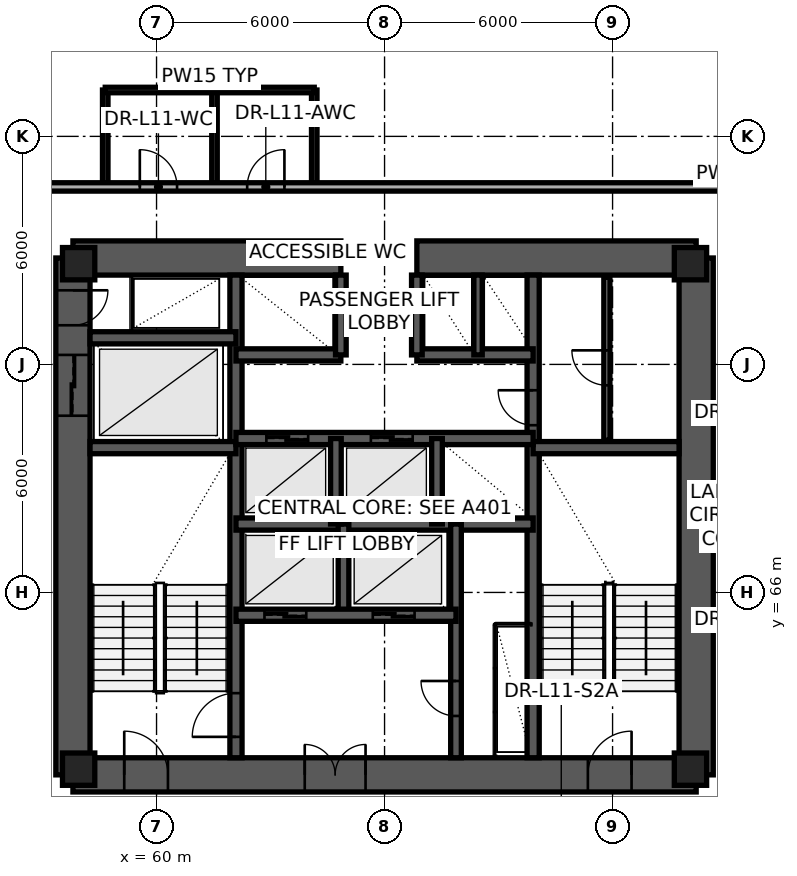
"""IFC4 building model, lengths in metres.
Left out: names, types, materials, properties, quantities, classifications, styles, units other than length and angle.
Written with IfcOpenShell. Run it as: python <this file> out.ifc"""

import sys

from ifc_helpers import new_model, si_unit, direction, frame, frame_2d, origin, origin_2d, place, context, subcontext, project, spatial, rectangle, extrude, element, fill, save


model = new_model("IFC4")
c1 = context("Model", 3, precision=1e-05, world=origin(), true_north=direction((0.0, 1.0)))
c2 = subcontext(c1, "Body", "Model", "MODEL_VIEW")
j1 = project(units=[si_unit("LENGTHUNIT", "METRE"), si_unit("PLANEANGLEUNIT", "RADIAN")], contexts=[c1])
p1 = place(None, origin())
s1 = spatial("IfcSite", under=j1, at=p1, CompositionType="ELEMENT")
p2 = place(p1, origin())
s2 = spatial("IfcBuilding", under=s1, at=p2, CompositionType="ELEMENT")
p3 = place(p2, frame((0.0, 0.0, 44.7)))
s3 = spatial("IfcBuildingStorey", under=s2, at=p3, CompositionType="ELEMENT", Elevation=44.7)
p4 = place(p3, frame((57.8, 61.2, 0.0), z_axis=(0.0, 0.0, 1.0), x_axis=(1.0, 0.0, 0.0)))
e1 = element("IfcWall", 1, at=p4, inside=s3, PredefinedType="SHEAR", context=c2, shape_type="SweptSolid", body=[
    extrude(rectangle(XDim=16.4, YDim=0.9, at=frame_2d((8.2, 0.0))), origin(), (0.0, 0.0, 1.0), 3.65),
])
p5 = place(p4, frame((1.35, 0.0, 0.0)))
e2 = element("IfcOpeningElement", 2, at=p5, cuts=e1, PredefinedType="OPENING", context=c2, shape_type="SweptSolid", body=[
    extrude(rectangle(XDim=1.15, YDim=2.15, at=frame_2d((0.575, 1.075))), frame((0.0, 0.46, 0.0), z_axis=(0.0, -1.0, 0.0), x_axis=(1.0, 0.0, 0.0)), (0.0, 0.0, 1.0), 0.92),
])
p6 = place(p4, frame((6.1, 0.0, 0.0)))
e3 = element("IfcOpeningElement", 3, at=p6, cuts=e1, PredefinedType="OPENING", context=c2, shape_type="SweptSolid", body=[
    extrude(rectangle(XDim=1.6, YDim=2.15, at=frame_2d((0.8, 1.075))), frame((0.0, 0.46, 0.0), z_axis=(0.0, -1.0, 0.0), x_axis=(1.0, 0.0, 0.0)), (0.0, 0.0, 1.0), 0.92),
])
p7 = place(p4, frame((13.55, 0.0, 0.0)))
e4 = element("IfcOpeningElement", 4, at=p7, cuts=e1, PredefinedType="OPENING", context=c2, shape_type="SweptSolid", body=[
    extrude(rectangle(XDim=1.15, YDim=2.15, at=frame_2d((0.575, 1.075))), frame((0.0, 0.46, 0.0), z_axis=(0.0, -1.0, 0.0), x_axis=(1.0, 0.0, 0.0)), (0.0, 0.0, 1.0), 0.92),
])
p8 = place(p3, frame((74.2, 61.2, 0.0), z_axis=(0.0, 0.0, 1.0), x_axis=(0.0, 1.0, 0.0)))
e5 = element("IfcWall", 5, at=p8, inside=s3, PredefinedType="SHEAR", context=c2, shape_type="SweptSolid", body=[
    extrude(rectangle(XDim=13.6, YDim=0.9, at=frame_2d((6.8, 0.0))), origin(), (0.0, 0.0, 1.0), 3.65),
])
p9 = place(p3, frame((74.2, 74.8, 0.0), z_axis=(0.0, 0.0, 1.0), x_axis=(-1.0, 0.0, 0.0)))
e6 = element("IfcWall", 6, at=p9, inside=s3, PredefinedType="SHEAR", context=c2, shape_type="SweptSolid", body=[
    extrude(rectangle(XDim=7.35, YDim=0.9, at=frame_2d((3.675, 0.0))), origin(), (0.0, 0.0, 1.0), 3.65),
])
p10 = place(p3, frame((64.85, 74.8, 0.0), z_axis=(0.0, 0.0, 1.0), x_axis=(-1.0, 0.0, 0.0)))
e7 = element("IfcWall", 7, at=p10, inside=s3, PredefinedType="SHEAR", context=c2, shape_type="SweptSolid", body=[
    extrude(rectangle(XDim=7.05, YDim=0.9, at=frame_2d((3.525, 0.0))), origin(), (0.0, 0.0, 1.0), 3.65),
])
p11 = place(p3, frame((57.8, 74.8, 0.0), z_axis=(0.0, 0.0, 1.0), x_axis=(0.0, -1.0, 0.0)))
e8 = element("IfcWall", 8, at=p11, inside=s3, PredefinedType="SHEAR", context=c2, shape_type="SweptSolid", body=[
    extrude(rectangle(XDim=13.6, YDim=0.9, at=frame_2d((6.8, 0.0))), origin(), (0.0, 0.0, 1.0), 3.65),
])
p12 = place(p11, frame((0.85, 0.0, 0.0)))
e9 = element("IfcOpeningElement", 9, at=p12, cuts=e8, PredefinedType="OPENING", context=c2, shape_type="SweptSolid", body=[
    extrude(rectangle(XDim=0.92, YDim=2.05, at=frame_2d((0.46, 1.025))), frame((0.0, 0.46, 0.0), z_axis=(0.0, -1.0, 0.0), x_axis=(1.0, 0.0, 0.0)), (0.0, 0.0, 1.0), 0.92),
])
p13 = place(p11, frame((2.55, 0.0, 0.0)))
e10 = element("IfcOpeningElement", 10, at=p13, cuts=e8, PredefinedType="OPENING", context=c2, shape_type="SweptSolid", body=[
    extrude(rectangle(XDim=1.6, YDim=2.3, at=frame_2d((0.8, 1.15))), frame((0.0, 0.46, 0.0), z_axis=(0.0, -1.0, 0.0), x_axis=(1.0, 0.0, 0.0)), (0.0, 0.0, 1.0), 0.92),
])
p14 = place(p3, frame((62.09, 61.65, 0.0), z_axis=(0.0, 0.0, 1.0), x_axis=(0.0, 1.0, 0.0)))
e11 = element("IfcWall", 11, at=p14, inside=s3, PredefinedType="SHEAR", context=c2, shape_type="SweptSolid", body=[
    extrude(rectangle(XDim=12.7, YDim=0.32, at=frame_2d((6.35, 0.0))), origin(), (0.0, 0.0, 1.0), 3.65),
])
p15 = place(p14, frame((0.55, 0.0, 0.0)))
e12 = element("IfcOpeningElement", 12, at=p15, cuts=e11, PredefinedType="OPENING", context=c2, shape_type="SweptSolid", body=[
    extrude(rectangle(XDim=1.15, YDim=2.15, at=frame_2d((0.575, 1.075))), frame((0.0, 0.17, 0.0), z_axis=(0.0, -1.0, 0.0), x_axis=(1.0, 0.0, 0.0)), (0.0, 0.0, 1.0), 0.34),
])
p16 = place(p3, frame((69.91, 61.65, 0.0), z_axis=(0.0, 0.0, 1.0), x_axis=(0.0, 1.0, 0.0)))
e13 = element("IfcWall", 13, at=p16, inside=s3, PredefinedType="SHEAR", context=c2, shape_type="SweptSolid", body=[
    extrude(rectangle(XDim=12.7, YDim=0.32, at=frame_2d((6.35, 0.0))), origin(), (0.0, 0.0, 1.0), 3.65),
])
p17 = place(p16, frame((8.75, 0.0, 0.0)))
e14 = element("IfcOpeningElement", 14, at=p17, cuts=e13, PredefinedType="OPENING", context=c2, shape_type="SweptSolid", body=[
    extrude(rectangle(XDim=0.92, YDim=2.05, at=frame_2d((0.46, 1.025))), frame((0.0, 0.17, 0.0), z_axis=(0.0, -1.0, 0.0), x_axis=(1.0, 0.0, 0.0)), (0.0, 0.0, 1.0), 0.34),
])
for number, where, z_axis, x_axis in (
    (15, (58.25, 69.81, 0.0), (0.0, 0.0, 1.0), (1.0, 0.0, 0.0)),
    (16, (69.91, 69.81, 0.0), (0.0, 0.0, 1.0), (1.0, 0.0, 0.0)),
    (17, (58.25, 72.7, 0.0), (0.0, 0.0, 1.0), (1.0, 0.0, 0.0)),
):
    element("IfcWall", number, at=place(p3, frame(where, z_axis=z_axis, x_axis=x_axis)), inside=s3, PredefinedType="SHEAR", context=c2, shape_type="SweptSolid", body=[
        extrude(rectangle(XDim=3.84, YDim=0.32, at=frame_2d((1.92, 0.0))), origin(), (0.0, 0.0, 1.0), 3.65),
    ])
p18 = place(p3, frame((62.09, 67.8, 0.0), z_axis=(0.0, 0.0, 1.0), x_axis=(1.0, 0.0, 0.0)))
e18 = element("IfcWall", 18, at=p18, inside=s3, PredefinedType="SHEAR", context=c2, shape_type="SweptSolid", body=[
    extrude(rectangle(XDim=7.82, YDim=0.32, at=frame_2d((3.91, 0.0))), origin(), (0.0, 0.0, 1.0), 3.65),
])
p19 = place(p3, frame((64.92, 65.4, 0.0), z_axis=(0.0, 0.0, 1.0), x_axis=(0.0, 1.0, 0.0)))
e19 = element("IfcWall", 19, at=p19, inside=s3, PredefinedType="SHEAR", context=c2, shape_type="SweptSolid", body=[
    extrude(rectangle(XDim=2.4, YDim=0.28, at=frame_2d((1.2, 0.0))), origin(), (0.0, 0.0, 1.0), 3.65),
])
p20 = place(p3, frame((62.09, 70.05, 0.0), z_axis=(0.0, 0.0, 1.0), x_axis=(1.0, 0.0, 0.0)))
e20 = element("IfcWall", 20, at=p20, inside=s3, PredefinedType="SHEAR", context=c2, shape_type="SweptSolid", body=[
    extrude(rectangle(XDim=7.82, YDim=0.32, at=frame_2d((3.91, 0.0))), origin(), (0.0, 0.0, 1.0), 3.65),
])
p21 = place(p20, frame((0.8, 0.0, 0.0)))
e21 = element("IfcOpeningElement", 21, at=p21, cuts=e20, PredefinedType="OPENING", context=c2, shape_type="SweptSolid", body=[
    extrude(rectangle(XDim=1.1, YDim=2.2, at=frame_2d((0.55, 1.1))), frame((0.0, 0.17, 0.0), z_axis=(0.0, -1.0, 0.0), x_axis=(1.0, 0.0, 0.0)), (0.0, 0.0, 1.0), 0.34),
])
p22 = place(p20, frame((3.55, 0.0, 0.0)))
e22 = element("IfcOpeningElement", 22, at=p22, cuts=e20, PredefinedType="OPENING", context=c2, shape_type="SweptSolid", body=[
    extrude(rectangle(XDim=1.1, YDim=2.2, at=frame_2d((0.55, 1.1))), frame((0.0, 0.17, 0.0), z_axis=(0.0, -1.0, 0.0), x_axis=(1.0, 0.0, 0.0)), (0.0, 0.0, 1.0), 0.34),
])
p23 = place(p3, frame((62.09, 72.25, 0.0), z_axis=(0.0, 0.0, 1.0), x_axis=(1.0, 0.0, 0.0)))
e23 = element("IfcWall", 23, at=p23, inside=s3, PredefinedType="SHEAR", context=c2, shape_type="SweptSolid", body=[
    extrude(rectangle(XDim=2.76, YDim=0.32, at=frame_2d((1.38, 0.0))), origin(), (0.0, 0.0, 1.0), 3.65),
])
p24 = place(p3, frame((66.85, 72.25, 0.0), z_axis=(0.0, 0.0, 1.0), x_axis=(1.0, 0.0, 0.0)))
e24 = element("IfcWall", 24, at=p24, inside=s3, PredefinedType="SHEAR", context=c2, shape_type="SweptSolid", body=[
    extrude(rectangle(XDim=3.06, YDim=0.32, at=frame_2d((1.53, 0.0))), origin(), (0.0, 0.0, 1.0), 3.65),
])
for number, where, z_axis, x_axis in (
    (25, (64.85, 72.25, 0.0), (0.0, 0.0, 1.0), (0.0, 1.0, 0.0)),
    (26, (66.85, 72.25, 0.0), (0.0, 0.0, 1.0), (0.0, 1.0, 0.0)),
):
    element("IfcWall", number, at=place(p3, frame(where, z_axis=z_axis, x_axis=x_axis)), inside=s3, PredefinedType="SHEAR", context=c2, shape_type="SweptSolid", body=[
        extrude(rectangle(XDim=2.1, YDim=0.28, at=frame_2d((1.05, 0.0))), origin(), (0.0, 0.0, 1.0), 3.65),
    ])
p25 = place(p3, frame((68.46, 72.25, 0.0), z_axis=(0.0, 0.0, 1.0), x_axis=(0.0, 1.0, 0.0)))
e27 = element("IfcWall", 27, at=p25, inside=s3, PredefinedType="SHEAR", context=c2, shape_type="SweptSolid", body=[
    extrude(rectangle(XDim=2.1, YDim=0.22, at=frame_2d((1.05, 0.0))), origin(), (0.0, 0.0, 1.0), 3.65),
])
p26 = place(p3, frame((67.88, 61.65, 0.0), z_axis=(0.0, 0.0, 1.0), x_axis=(0.0, 1.0, 0.0)))
e28 = element("IfcWall", 28, at=p26, inside=s3, PredefinedType="SHEAR", context=c2, shape_type="SweptSolid", body=[
    extrude(rectangle(XDim=6.15, YDim=0.28, at=frame_2d((3.075, 0.0))), origin(), (0.0, 0.0, 1.0), 3.65),
])
p27 = place(p26, frame((1.1, 0.0, 0.0)))
e29 = element("IfcOpeningElement", 29, at=p27, cuts=e28, PredefinedType="OPENING", context=c2, shape_type="SweptSolid", body=[
    extrude(rectangle(XDim=0.92, YDim=2.05, at=frame_2d((0.46, 1.025))), frame((0.0, 0.15, 0.0), z_axis=(0.0, -1.0, 0.0), x_axis=(1.0, 0.0, 0.0)), (0.0, 0.0, 1.0), 0.3),
])
p28 = place(p3, frame((62.09, 65.4, 0.0), z_axis=(0.0, 0.0, 1.0), x_axis=(1.0, 0.0, 0.0)))
e30 = element("IfcWall", 30, at=p28, inside=s3, PredefinedType="SHEAR", context=c2, shape_type="SweptSolid", body=[
    extrude(rectangle(XDim=5.79, YDim=0.32, at=frame_2d((2.895, 0.0))), origin(), (0.0, 0.0, 1.0), 3.65),
])
p29 = place(p28, frame((0.75, 0.0, 0.0)))
e31 = element("IfcOpeningElement", 31, at=p29, cuts=e30, PredefinedType="OPENING", context=c2, shape_type="SweptSolid", body=[
    extrude(rectangle(XDim=1.1, YDim=2.2, at=frame_2d((0.55, 1.1))), frame((0.0, 0.17, 0.0), z_axis=(0.0, -1.0, 0.0), x_axis=(1.0, 0.0, 0.0)), (0.0, 0.0, 1.0), 0.34),
])
p30 = place(p28, frame((3.6, 0.0, 0.0)))
e32 = element("IfcOpeningElement", 32, at=p30, cuts=e30, PredefinedType="OPENING", context=c2, shape_type="SweptSolid", body=[
    extrude(rectangle(XDim=1.1, YDim=2.2, at=frame_2d((0.55, 1.1))), frame((0.0, 0.17, 0.0), z_axis=(0.0, -1.0, 0.0), x_axis=(1.0, 0.0, 0.0)), (0.0, 0.0, 1.0), 0.34),
])
for number, where, z_axis, x_axis in (
    (33, (64.72, 67.8, 0.0), (0.0, 0.0, 1.0), (0.0, 1.0, 0.0)),
    (34, (67.38, 67.8, 0.0), (0.0, 0.0, 1.0), (0.0, 1.0, 0.0)),
):
    element("IfcWall", number, at=place(p3, frame(where, z_axis=z_axis, x_axis=x_axis)), inside=s3, PredefinedType="SHEAR", context=c2, shape_type="SweptSolid", body=[
        extrude(rectangle(XDim=2.25, YDim=0.28, at=frame_2d((1.125, 0.0))), origin(), (0.0, 0.0, 1.0), 3.65),
    ])
for number, where, z_axis, x_axis in (
    (35, (57.95, 61.35, 0.0), (0.0, 0.0, 1.0), (1.0, 0.0, 0.0)),
    (36, (74.05, 61.35, 0.0), (0.0, 0.0, 1.0), (1.0, 0.0, 0.0)),
    (37, (74.05, 74.65, 0.0), (0.0, 0.0, 1.0), (1.0, 0.0, 0.0)),
    (38, (57.95, 74.65, 0.0), (0.0, 0.0, 1.0), (1.0, 0.0, 0.0)),
):
    element("IfcColumn", number, at=place(p3, frame(where, z_axis=z_axis, x_axis=x_axis)), inside=s3, PredefinedType="COLUMN", context=c2, shape_type="SweptSolid", body=[
        extrude(rectangle(XDim=0.85, YDim=0.85, at=origin_2d()), origin(), (0.0, 0.0, 1.0), 3.65),
    ])
p31 = place(p3, frame((61.237, 19.49, 0.0), z_axis=(0.0, 0.0, 1.0), x_axis=(-0.401097303432, 0.916035454106, 0.0)))
e39 = element("IfcWall", 39, at=p31, inside=s3, PredefinedType="STANDARD", context=c2, shape_type="SweptSolid", body=[
    extrude(rectangle(XDim=71.007, YDim=0.34, at=frame_2d((35.503, 0.0))), origin(), (0.0, 0.0, 1.0), 0.85),
])
p32 = place(p3, frame((71.85, 70.0, 0.0), z_axis=(0.0, 0.0, 1.0), x_axis=(0.0, 1.0, 0.0)))
e40 = element("IfcWall", 40, at=p32, inside=s3, PredefinedType="PARTITIONING", context=c2, shape_type="SweptSolid", body=[
    extrude(rectangle(XDim=4.3, YDim=0.16, at=frame_2d((2.15, 0.0))), origin(), (0.0, 0.0, 1.0), 3.375),
])
p33 = place(p32, frame((1.45, 0.0, 0.0)))
e41 = element("IfcOpeningElement", 41, at=p33, cuts=e40, PredefinedType="OPENING", context=c2, shape_type="SweptSolid", body=[
    extrude(rectangle(XDim=0.92, YDim=2.05, at=frame_2d((0.46, 1.025))), frame((0.0, 0.09, 0.0), z_axis=(0.0, -1.0, 0.0), x_axis=(1.0, 0.0, 0.0)), (0.0, 0.0, 1.0), 0.18),
])
for number, where, z_axis, x_axis in (
    (42, (58.65, 76.67, 0.0), (0.0, 0.0, 1.0), (0.0, 1.0, 0.0)),
    (43, (61.525, 76.67, 0.0), (0.0, 0.0, 1.0), (0.0, 1.0, 0.0)),
    (44, (64.15, 76.67, 0.0), (0.0, 0.0, 1.0), (0.0, 1.0, 0.0)),
):
    element("IfcWall", number, at=place(p3, frame(where, z_axis=z_axis, x_axis=x_axis)), inside=s3, PredefinedType="PARTITIONING", context=c2, shape_type="SweptSolid", body=[
        extrude(rectangle(XDim=2.55, YDim=0.145, at=frame_2d((1.275, 0.0))), origin(), (0.0, 0.0, 1.0), 3.375),
    ])
p34 = place(p3, frame((58.65, 79.22, 0.0), z_axis=(0.0, 0.0, 1.0), x_axis=(1.0, 0.0, 0.0)))
e45 = element("IfcWall", 45, at=p34, inside=s3, PredefinedType="PARTITIONING", context=c2, shape_type="SweptSolid", body=[
    extrude(rectangle(XDim=5.5, YDim=0.145, at=frame_2d((2.75, 0.0))), origin(), (0.0, 0.0, 1.0), 3.375),
])
p35 = place(p3, frame((55.23, 76.67, 0.0), z_axis=(0.0, 0.0, 1.0), x_axis=(1.0, 0.0, 0.0)))
e46 = element("IfcWall", 46, at=p35, inside=s3, PredefinedType="PARTITIONING", context=c2, shape_type="SweptSolid", body=[
    extrude(rectangle(XDim=40.478, YDim=0.22, at=frame_2d((20.239, 0.0))), origin(), (0.0, 0.0, 1.0), 2.505),
])
p36 = place(p35, frame((4.33, 0.0, 0.0)))
e47 = element("IfcOpeningElement", 47, at=p36, cuts=e46, PredefinedType="OPENING", context=c2, shape_type="SweptSolid", body=[
    extrude(rectangle(XDim=0.98, YDim=2.1, at=frame_2d((0.49, 1.05))), frame((0.0, 0.12, 0.0), z_axis=(0.0, -1.0, 0.0), x_axis=(1.0, 0.0, 0.0)), (0.0, 0.0, 1.0), 0.24),
])
p37 = place(p35, frame((7.155, 0.0, 0.0)))
e48 = element("IfcOpeningElement", 48, at=p37, cuts=e46, PredefinedType="OPENING", context=c2, shape_type="SweptSolid", body=[
    extrude(rectangle(XDim=0.98, YDim=2.1, at=frame_2d((0.49, 1.05))), frame((0.0, 0.12, 0.0), z_axis=(0.0, -1.0, 0.0), x_axis=(1.0, 0.0, 0.0)), (0.0, 0.0, 1.0), 0.24),
])
p38 = place(p35, frame((24.164, 0.0, 0.0)))
e49 = element("IfcOpeningElement", 49, at=p38, cuts=e46, PredefinedType="OPENING", context=c2, shape_type="SweptSolid", body=[
    extrude(rectangle(XDim=1.0, YDim=2.1, at=frame_2d((0.5, 1.05))), frame((0.0, 0.12, 0.0), z_axis=(0.0, -1.0, 0.0), x_axis=(1.0, 0.0, 0.0)), (0.0, 0.0, 1.0), 0.24),
])
p39 = place(p15, origin())
e50 = element("IfcDoor", 50, at=p39, inside=s3, OperationType="SINGLE_SWING_LEFT", PredefinedType="DOOR", context=c2, shape_type="SweptSolid", body=[
    extrude(rectangle(XDim=1.15, YDim=2.15, at=frame_2d((0.575, 1.075))), frame((0.0, 0.025, 0.0), z_axis=(0.0, -1.0, 0.0), x_axis=(1.0, 0.0, 0.0)), (0.0, 0.0, 1.0), 0.05),
])
fill(e12, e50)
p40 = place(p27, origin())
e51 = element("IfcDoor", 51, at=p40, inside=s3, OperationType="SINGLE_SWING_RIGHT", PredefinedType="DOOR", context=c2, shape_type="SweptSolid", body=[
    extrude(rectangle(XDim=0.92, YDim=2.05, at=frame_2d((0.46, 1.025))), frame((0.0, 0.025, 0.0), z_axis=(0.0, -1.0, 0.0), x_axis=(1.0, 0.0, 0.0)), (0.0, 0.0, 1.0), 0.05),
])
fill(e29, e51)
p41 = place(p29, origin())
e52 = element("IfcDoor", 52, at=p41, inside=s3, OperationType="SLIDING_TO_LEFT", PredefinedType="DOOR", context=c2, shape_type="SweptSolid", body=[
    extrude(rectangle(XDim=1.1, YDim=2.2, at=frame_2d((0.55, 1.1))), frame((0.0, 0.025, 0.0), z_axis=(0.0, -1.0, 0.0), x_axis=(1.0, 0.0, 0.0)), (0.0, 0.0, 1.0), 0.05),
])
fill(e31, e52)
p42 = place(p30, origin())
e53 = element("IfcDoor", 53, at=p42, inside=s3, OperationType="SLIDING_TO_LEFT", PredefinedType="DOOR", context=c2, shape_type="SweptSolid", body=[
    extrude(rectangle(XDim=1.1, YDim=2.2, at=frame_2d((0.55, 1.1))), frame((0.0, 0.025, 0.0), z_axis=(0.0, -1.0, 0.0), x_axis=(1.0, 0.0, 0.0)), (0.0, 0.0, 1.0), 0.05),
])
fill(e32, e53)
p43 = place(p21, origin())
e54 = element("IfcDoor", 54, at=p43, inside=s3, OperationType="SLIDING_TO_LEFT", PredefinedType="DOOR", context=c2, shape_type="SweptSolid", body=[
    extrude(rectangle(XDim=1.1, YDim=2.2, at=frame_2d((0.55, 1.1))), frame((0.0, 0.025, 0.0), z_axis=(0.0, -1.0, 0.0), x_axis=(1.0, 0.0, 0.0)), (0.0, 0.0, 1.0), 0.05),
])
fill(e21, e54)
p44 = place(p22, origin())
e55 = element("IfcDoor", 55, at=p44, inside=s3, OperationType="SLIDING_TO_LEFT", PredefinedType="DOOR", context=c2, shape_type="SweptSolid", body=[
    extrude(rectangle(XDim=1.1, YDim=2.2, at=frame_2d((0.55, 1.1))), frame((0.0, 0.025, 0.0), z_axis=(0.0, -1.0, 0.0), x_axis=(1.0, 0.0, 0.0)), (0.0, 0.0, 1.0), 0.05),
])
fill(e22, e55)
p45 = place(p5, origin())
e56 = element("IfcDoor", 56, at=p45, inside=s3, OperationType="SINGLE_SWING_LEFT", PredefinedType="DOOR", context=c2, shape_type="SweptSolid", body=[
    extrude(rectangle(XDim=1.15, YDim=2.15, at=frame_2d((0.575, 1.075))), frame((0.0, 0.025, 0.0), z_axis=(0.0, -1.0, 0.0), x_axis=(1.0, 0.0, 0.0)), (0.0, 0.0, 1.0), 0.05),
])
fill(e2, e56)
p46 = place(p6, origin())
e57 = element("IfcDoor", 57, at=p46, inside=s3, OperationType="DOUBLE_DOOR_SINGLE_SWING", PredefinedType="DOOR", context=c2, shape_type="SweptSolid", body=[
    extrude(rectangle(XDim=1.6, YDim=2.15, at=frame_2d((0.8, 1.075))), frame((0.0, 0.025, 0.0), z_axis=(0.0, -1.0, 0.0), x_axis=(1.0, 0.0, 0.0)), (0.0, 0.0, 1.0), 0.05),
])
fill(e3, e57)
p47 = place(p7, origin())
e58 = element("IfcDoor", 58, at=p47, inside=s3, OperationType="SINGLE_SWING_RIGHT", PredefinedType="DOOR", context=c2, shape_type="SweptSolid", body=[
    extrude(rectangle(XDim=1.15, YDim=2.15, at=frame_2d((0.575, 1.075))), frame((0.0, 0.025, 0.0), z_axis=(0.0, -1.0, 0.0), x_axis=(1.0, 0.0, 0.0)), (0.0, 0.0, 1.0), 0.05),
])
fill(e4, e58)
p48 = place(p12, origin())
e59 = element("IfcDoor", 59, at=p48, inside=s3, OperationType="SINGLE_SWING_LEFT", PredefinedType="DOOR", context=c2, shape_type="SweptSolid", body=[
    extrude(rectangle(XDim=0.92, YDim=2.05, at=frame_2d((0.46, 1.025))), frame((0.0, 0.025, 0.0), z_axis=(0.0, -1.0, 0.0), x_axis=(1.0, 0.0, 0.0)), (0.0, 0.0, 1.0), 0.05),
])
fill(e9, e59)
p49 = place(p13, origin())
e60 = element("IfcDoor", 60, at=p49, inside=s3, OperationType="DOUBLE_DOOR_SLIDING", PredefinedType="DOOR", context=c2, shape_type="SweptSolid", body=[
    extrude(rectangle(XDim=1.6, YDim=2.3, at=frame_2d((0.8, 1.15))), frame((0.0, 0.025, 0.0), z_axis=(0.0, -1.0, 0.0), x_axis=(1.0, 0.0, 0.0)), (0.0, 0.0, 1.0), 0.05),
])
fill(e10, e60)
p50 = place(p17, origin())
e61 = element("IfcDoor", 61, at=p50, inside=s3, OperationType="SINGLE_SWING_RIGHT", PredefinedType="DOOR", context=c2, shape_type="SweptSolid", body=[
    extrude(rectangle(XDim=0.92, YDim=2.05, at=frame_2d((0.46, 1.025))), frame((0.0, 0.025, 0.0), z_axis=(0.0, -1.0, 0.0), x_axis=(1.0, 0.0, 0.0)), (0.0, 0.0, 1.0), 0.05),
])
fill(e14, e61)
p51 = place(p33, origin())
e62 = element("IfcDoor", 62, at=p51, inside=s3, OperationType="SINGLE_SWING_RIGHT", PredefinedType="DOOR", context=c2, shape_type="SweptSolid", body=[
    extrude(rectangle(XDim=0.92, YDim=2.05, at=frame_2d((0.46, 1.025))), frame((0.0, 0.025, 0.0), z_axis=(0.0, -1.0, 0.0), x_axis=(1.0, 0.0, 0.0)), (0.0, 0.0, 1.0), 0.05),
])
fill(e41, e62)
p52 = place(p36, origin())
e63 = element("IfcDoor", 63, at=p52, inside=s3, OperationType="SINGLE_SWING_LEFT", PredefinedType="DOOR", context=c2, shape_type="SweptSolid", body=[
    extrude(rectangle(XDim=0.98, YDim=2.1, at=frame_2d((0.49, 1.05))), frame((0.0, 0.025, 0.0), z_axis=(0.0, -1.0, 0.0), x_axis=(1.0, 0.0, 0.0)), (0.0, 0.0, 1.0), 0.05),
])
fill(e47, e63)
p53 = place(p37, origin())
e64 = element("IfcDoor", 64, at=p53, inside=s3, OperationType="SINGLE_SWING_RIGHT", PredefinedType="DOOR", context=c2, shape_type="SweptSolid", body=[
    extrude(rectangle(XDim=0.98, YDim=2.1, at=frame_2d((0.49, 1.05))), frame((0.0, 0.025, 0.0), z_axis=(0.0, -1.0, 0.0), x_axis=(1.0, 0.0, 0.0)), (0.0, 0.0, 1.0), 0.05),
])
fill(e48, e64)
save(model, sys.argv[1])
